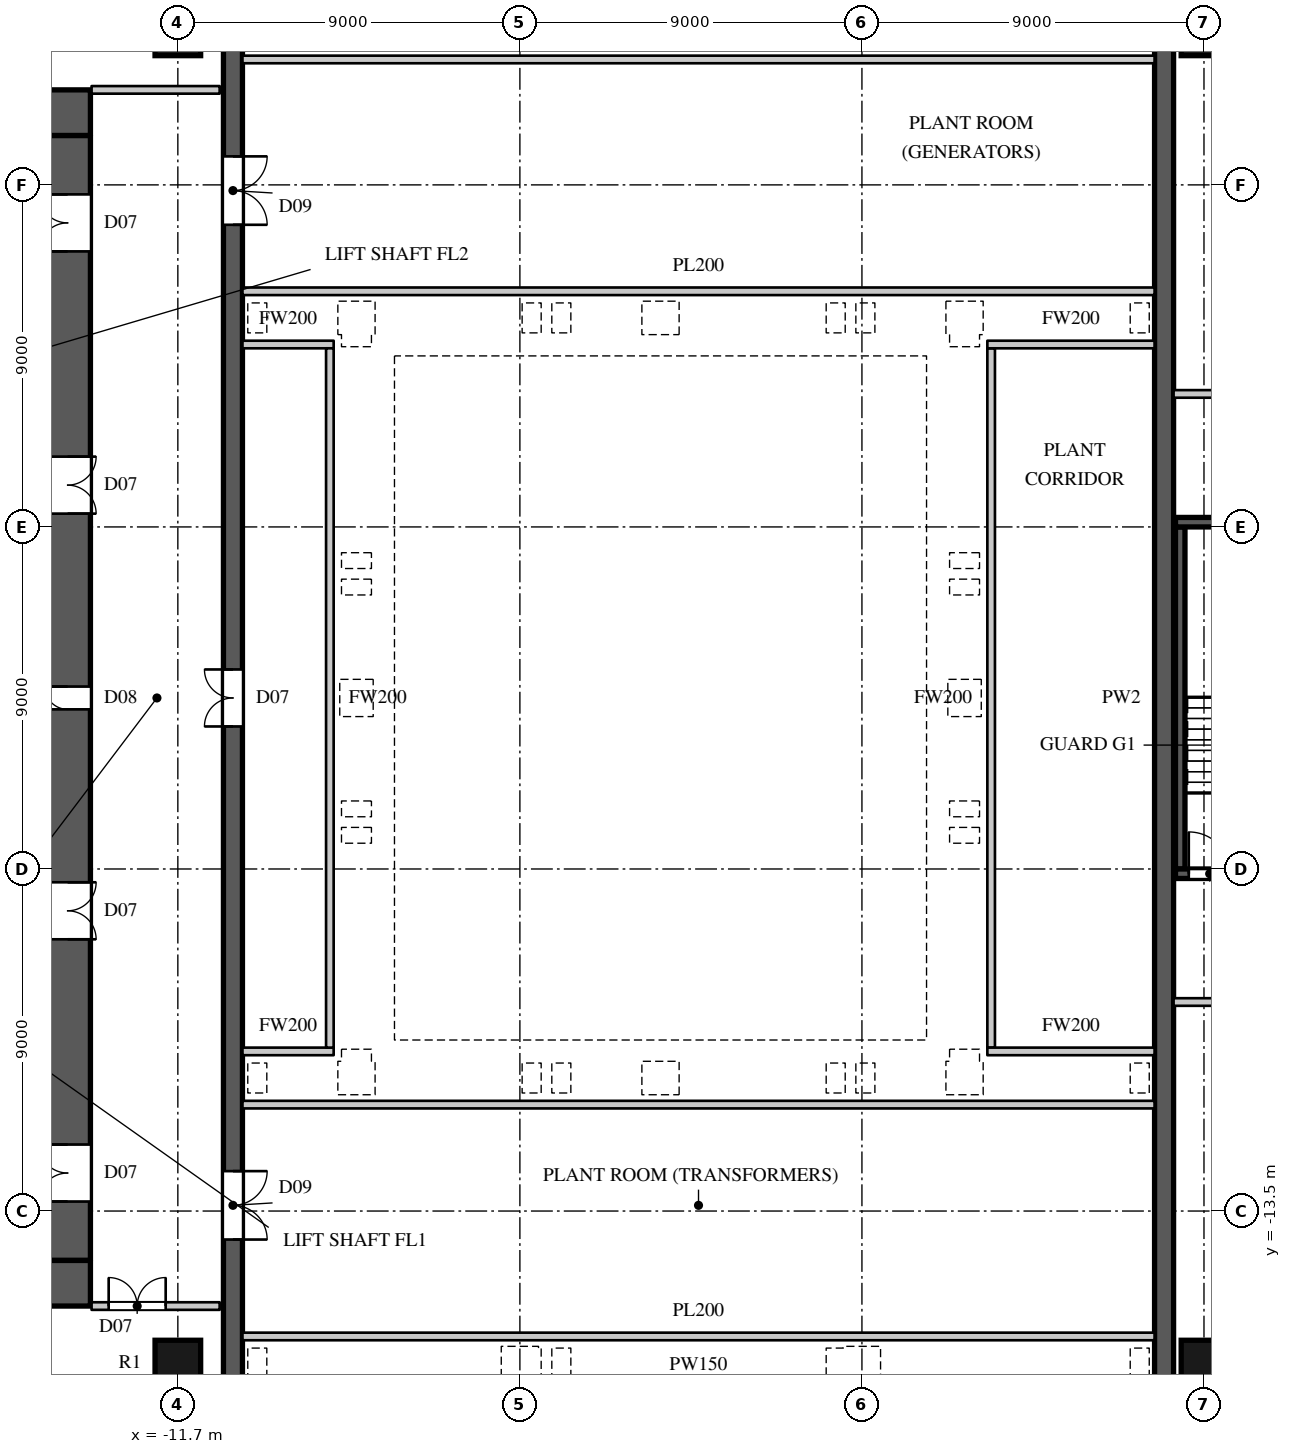
"""IFC4 building model, lengths in metres.
Left out: names, types, materials, properties, quantities, classifications, styles, units other than length and angle.
Written with IfcOpenShell. Run it as: python <this file> out.ifc"""

import sys

from ifc_helpers import new_model, si_unit, direction, frame, frame_2d, origin, origin_2d, place, context, subcontext, project, spatial, rectangle, circle, extrude, element, fill, save


model = new_model("IFC4")
c1 = context("Model", 3, precision=1e-05, world=origin(), true_north=direction((0.0, 1.0)))
c2 = subcontext(c1, "Body", "Model", "MODEL_VIEW")
j1 = project(units=[si_unit("LENGTHUNIT", "METRE"), si_unit("PLANEANGLEUNIT", "RADIAN")], contexts=[c1])
p1 = place(None, origin())
s1 = spatial("IfcSite", under=j1, at=p1, CompositionType="ELEMENT")
p2 = place(p1, origin())
s2 = spatial("IfcBuilding", under=s1, at=p2, CompositionType="ELEMENT")
p3 = place(p2, frame((0.0, 0.0, 29.0)))
s3 = spatial("IfcBuildingStorey", under=s2, at=p3, CompositionType="ELEMENT", Elevation=29.0)
p4 = place(p3, frame((-10.25, -19.5, 0.0), z_axis=(0.0, 0.0, 1.0), x_axis=(0.0, 1.0, 0.0)))
e1 = element("IfcWall", 1, at=p4, inside=s3, PredefinedType="SOLIDWALL", context=c2, shape_type="SweptSolid", body=[
    extrude(rectangle(XDim=39.0, YDim=0.5, at=frame_2d((19.5, 0.0))), origin(), (0.0, 0.0, 1.0), 7.0),
])
p5 = place(p4, frame((18.75, 0.0, 0.0)))
e2 = element("IfcOpeningElement", 2, at=p5, cuts=e1, PredefinedType="OPENING", context=c2, shape_type="SweptSolid", body=[
    extrude(rectangle(XDim=1.5, YDim=2.4, at=frame_2d((0.75, 1.2))), frame((0.0, 0.26, 0.0), z_axis=(0.0, -1.0, 0.0), x_axis=(1.0, 0.0, 0.0)), (0.0, 0.0, 1.0), 0.52),
])
p6 = place(p4, frame((31.95, 0.0, 0.0)))
e3 = element("IfcOpeningElement", 3, at=p6, cuts=e1, PredefinedType="OPENING", context=c2, shape_type="SweptSolid", body=[
    extrude(rectangle(XDim=1.8, YDim=2.4, at=frame_2d((0.9, 1.2))), frame((0.0, 0.26, 0.0), z_axis=(0.0, -1.0, 0.0), x_axis=(1.0, 0.0, 0.0)), (0.0, 0.0, 1.0), 0.52),
])
p7 = place(p4, frame((5.25, 0.0, 0.0)))
e4 = element("IfcOpeningElement", 4, at=p7, cuts=e1, PredefinedType="OPENING", context=c2, shape_type="SweptSolid", body=[
    extrude(rectangle(XDim=1.8, YDim=2.4, at=frame_2d((0.9, 1.2))), frame((0.0, 0.26, 0.0), z_axis=(0.0, -1.0, 0.0), x_axis=(1.0, 0.0, 0.0)), (0.0, 0.0, 1.0), 0.52),
])
p8 = place(p3, frame((14.25, -19.5, 0.0), z_axis=(0.0, 0.0, 1.0), x_axis=(0.0, 1.0, 0.0)))
e5 = element("IfcWall", 5, at=p8, inside=s3, PredefinedType="SOLIDWALL", context=c2, shape_type="SweptSolid", body=[
    extrude(rectangle(XDim=39.0, YDim=0.5, at=frame_2d((19.5, 0.0))), origin(), (0.0, 0.0, 1.0), 7.0),
])
for number, where, z_axis, x_axis in (
    (6, (-11.7, -17.5, 0.0), (0.0, 0.0, 1.0), (1.0, 0.0, 0.0)),
    (7, (15.3, -17.5, 0.0), (0.0, 0.0, 1.0), (1.0, 0.0, 0.0)),
    (8, (-11.7, 17.5, 0.0), (0.0, 0.0, 1.0), (1.0, 0.0, 0.0)),
    (9, (15.3, 17.5, 0.0), (0.0, 0.0, 1.0), (1.0, 0.0, 0.0)),
):
    element("IfcColumn", number, at=place(p3, frame(where, z_axis=z_axis, x_axis=x_axis)), inside=s3, PredefinedType="COLUMN", context=c2, shape_type="SweptSolid", body=[
        extrude(circle(Radius=0.6, at=origin_2d()), origin(), (0.0, 0.0, 1.0), 7.0),
    ])
for number, where, z_axis, x_axis in (
    (10, (-30.0, 15.4, 0.0), (0.0, 0.0, 1.0), (1.0, 0.0, 0.0)),
    (11, (-30.0, -15.4, 0.0), (0.0, 0.0, 1.0), (1.0, 0.0, 0.0)),
):
    element("IfcWall", number, at=place(p3, frame(where, z_axis=z_axis, x_axis=x_axis)), inside=s3, PredefinedType="SHEAR", context=c2, shape_type="SweptSolid", body=[
        extrude(rectangle(XDim=16.0, YDim=1.2, at=frame_2d((8.0, 0.0))), origin(), (0.0, 0.0, 1.0), 7.0),
    ])
p9 = place(p3, frame((-14.6, -14.8, 0.0), z_axis=(0.0, 0.0, 1.0), x_axis=(0.0, 1.0, 0.0)))
e12 = element("IfcWall", 12, at=p9, inside=s3, PredefinedType="SHEAR", context=c2, shape_type="SweptSolid", body=[
    extrude(rectangle(XDim=29.6, YDim=1.2, at=frame_2d((14.8, 0.0))), origin(), (0.0, 0.0, 1.0), 7.0),
])
p10 = place(p9, frame((1.55, 0.0, 0.0)))
e13 = element("IfcOpeningElement", 13, at=p10, cuts=e12, PredefinedType="OPENING", context=c2, shape_type="SweptSolid", body=[
    extrude(rectangle(XDim=1.5, YDim=2.4, at=frame_2d((0.75, 1.2))), frame((0.0, 0.61, 0.0), z_axis=(0.0, -1.0, 0.0), x_axis=(1.0, 0.0, 0.0)), (0.0, 0.0, 1.0), 1.22),
])
p11 = place(p9, frame((26.55, 0.0, 0.0)))
e14 = element("IfcOpeningElement", 14, at=p11, cuts=e12, PredefinedType="OPENING", context=c2, shape_type="SweptSolid", body=[
    extrude(rectangle(XDim=1.5, YDim=2.4, at=frame_2d((0.75, 1.2))), frame((0.0, 0.61, 0.0), z_axis=(0.0, -1.0, 0.0), x_axis=(1.0, 0.0, 0.0)), (0.0, 0.0, 1.0), 1.22),
])
p12 = place(p9, frame((8.45, 0.0, 0.0)))
e15 = element("IfcOpeningElement", 15, at=p12, cuts=e12, PredefinedType="OPENING", context=c2, shape_type="SweptSolid", body=[
    extrude(rectangle(XDim=1.5, YDim=2.4, at=frame_2d((0.75, 1.2))), frame((0.0, 0.61, 0.0), z_axis=(0.0, -1.0, 0.0), x_axis=(1.0, 0.0, 0.0)), (0.0, 0.0, 1.0), 1.22),
])
p13 = place(p9, frame((19.65, 0.0, 0.0)))
e16 = element("IfcOpeningElement", 16, at=p13, cuts=e12, PredefinedType="OPENING", context=c2, shape_type="SweptSolid", body=[
    extrude(rectangle(XDim=1.5, YDim=2.4, at=frame_2d((0.75, 1.2))), frame((0.0, 0.61, 0.0), z_axis=(0.0, -1.0, 0.0), x_axis=(1.0, 0.0, 0.0)), (0.0, 0.0, 1.0), 1.22),
])
p14 = place(p9, frame((14.5, 0.0, 0.0)))
e17 = element("IfcOpeningElement", 17, at=p14, cuts=e12, PredefinedType="OPENING", context=c2, shape_type="SweptSolid", body=[
    extrude(rectangle(XDim=0.6, YDim=2.0, at=frame_2d((0.3, 1.0))), frame((0.0, 0.61, 0.0), z_axis=(0.0, -1.0, 0.0), x_axis=(1.0, 0.0, 0.0)), (0.0, 0.0, 1.0), 1.22),
])
p15 = place(p3, frame((-13.97, -16.0, 0.0), z_axis=(0.0, 0.0, 1.0), x_axis=(1.0, 0.0, 0.0)))
e18 = element("IfcWall", 18, at=p15, inside=s3, PredefinedType="PARTITIONING", context=c2, shape_type="SweptSolid", body=[
    extrude(rectangle(XDim=3.37, YDim=0.2, at=frame_2d((1.685, 0.0))), origin(), (0.0, 0.0, 1.0), 6.598),
])
p16 = place(p15, frame((0.45, 0.0, 0.0)))
e19 = element("IfcOpeningElement", 19, at=p16, cuts=e18, PredefinedType="OPENING", context=c2, shape_type="SweptSolid", body=[
    extrude(rectangle(XDim=1.5, YDim=2.4, at=frame_2d((0.75, 1.2))), frame((0.0, 0.11, 0.0), z_axis=(0.0, -1.0, 0.0), x_axis=(1.0, 0.0, 0.0)), (0.0, 0.0, 1.0), 0.22),
])
p17 = place(p3, frame((-13.97, 16.0, 0.0), z_axis=(0.0, 0.0, 1.0), x_axis=(1.0, 0.0, 0.0)))
e20 = element("IfcWall", 20, at=p17, inside=s3, PredefinedType="PARTITIONING", context=c2, shape_type="SweptSolid", body=[
    extrude(rectangle(XDim=3.37, YDim=0.2, at=frame_2d((1.685, 0.0))), origin(), (0.0, 0.0, 1.0), 6.598),
])
for number, where, z_axis, x_axis in (
    (21, (-10.0, -9.3, 0.0), (0.0, 0.0, 1.0), (1.0, 0.0, 0.0)),
    (22, (-10.0, 9.3, 0.0), (0.0, 0.0, 1.0), (1.0, 0.0, 0.0)),
):
    element("IfcWall", number, at=place(p3, frame(where, z_axis=z_axis, x_axis=x_axis)), inside=s3, PredefinedType="PARTITIONING", context=c2, shape_type="SweptSolid", body=[
        extrude(rectangle(XDim=2.4, YDim=0.2, at=frame_2d((1.2, 0.0))), origin(), (0.0, 0.0, 1.0), 6.598),
    ])
for number, where, z_axis, x_axis in (
    (23, (-7.7, -9.2, 0.0), (0.0, 0.0, 1.0), (0.0, 1.0, 0.0)),
    (24, (9.7, -9.2, 0.0), (0.0, 0.0, 1.0), (0.0, 1.0, 0.0)),
):
    element("IfcWall", number, at=place(p3, frame(where, z_axis=z_axis, x_axis=x_axis)), inside=s3, PredefinedType="PARTITIONING", context=c2, shape_type="SweptSolid", body=[
        extrude(rectangle(XDim=18.4, YDim=0.2, at=frame_2d((9.2, 0.0))), origin(), (0.0, 0.0, 1.0), 6.598),
    ])
for number, where, z_axis, x_axis in (
    (25, (9.6, -9.3, 0.0), (0.0, 0.0, 1.0), (1.0, 0.0, 0.0)),
    (26, (9.6, 9.3, 0.0), (0.0, 0.0, 1.0), (1.0, 0.0, 0.0)),
):
    element("IfcWall", number, at=place(p3, frame(where, z_axis=z_axis, x_axis=x_axis)), inside=s3, PredefinedType="PARTITIONING", context=c2, shape_type="SweptSolid", body=[
        extrude(rectangle(XDim=4.4, YDim=0.2, at=frame_2d((2.2, 0.0))), origin(), (0.0, 0.0, 1.0), 6.598),
    ])
p18 = place(p3, frame((14.5, -8.0, 0.0), z_axis=(0.0, 0.0, 1.0), x_axis=(1.0, 0.0, 0.0)))
e27 = element("IfcWall", 27, at=p18, inside=s3, PredefinedType="PARTITIONING", context=c2, shape_type="SweptSolid", body=[
    extrude(rectangle(XDim=13.47, YDim=0.2, at=frame_2d((6.735, 0.0))), origin(), (0.0, 0.0, 1.0), 6.598),
])
p19 = place(p18, frame((5.9, 0.0, 0.0)))
e28 = element("IfcOpeningElement", 28, at=p19, cuts=e27, PredefinedType="OPENING", context=c2, shape_type="SweptSolid", body=[
    extrude(rectangle(XDim=1.6, YDim=2.4, at=frame_2d((0.8, 1.2))), frame((0.0, 0.11, 0.0), z_axis=(0.0, -1.0, 0.0), x_axis=(1.0, 0.0, 0.0)), (0.0, 0.0, 1.0), 0.22),
])
for number, where, z_axis, x_axis in (
    (29, (-10.0, -16.8, 0.0), (0.0, 0.0, 1.0), (1.0, 0.0, 0.0)),
    (30, (-10.0, -10.7, 0.0), (0.0, 0.0, 1.0), (1.0, 0.0, 0.0)),
    (31, (-10.0, 10.7, 0.0), (0.0, 0.0, 1.0), (1.0, 0.0, 0.0)),
    (32, (-10.0, 16.8, 0.0), (0.0, 0.0, 1.0), (1.0, 0.0, 0.0)),
):
    element("IfcWall", number, at=place(p3, frame(where, z_axis=z_axis, x_axis=x_axis)), inside=s3, PredefinedType="PARTITIONING", context=c2, shape_type="SweptSolid", body=[
        extrude(rectangle(XDim=24.0, YDim=0.2, at=frame_2d((12.0, 0.0))), origin(), (0.0, 0.0, 1.0), 6.598),
    ])
p20 = place(p3, frame((14.5, 8.0, 0.0), z_axis=(0.0, 0.0, 1.0), x_axis=(1.0, 0.0, 0.0)))
e33 = element("IfcWall", 33, at=p20, inside=s3, PredefinedType="PARTITIONING", context=c2, shape_type="SweptSolid", body=[
    extrude(rectangle(XDim=13.47, YDim=0.2, at=frame_2d((6.735, 0.0))), origin(), (0.0, 0.0, 1.0), 6.598),
])
p21 = place(p20, frame((2.4, 0.0, 0.0)))
e34 = element("IfcOpeningElement", 34, at=p21, cuts=e33, PredefinedType="OPENING", context=c2, shape_type="SweptSolid", body=[
    extrude(rectangle(XDim=1.8, YDim=2.4, at=frame_2d((0.9, 1.2))), frame((0.0, 0.11, 0.0), z_axis=(0.0, -1.0, 0.0), x_axis=(1.0, 0.0, 0.0)), (0.0, 0.0, 1.0), 0.22),
])
p22 = place(p20, frame((9.05, 0.0, 0.0)))
e35 = element("IfcOpeningElement", 35, at=p22, cuts=e33, PredefinedType="OPENING", context=c2, shape_type="SweptSolid", body=[
    extrude(rectangle(XDim=1.8, YDim=2.4, at=frame_2d((0.9, 1.2))), frame((0.0, 0.11, 0.0), z_axis=(0.0, -1.0, 0.0), x_axis=(1.0, 0.0, 0.0)), (0.0, 0.0, 1.0), 0.22),
])
p23 = place(p3, frame((14.675, -4.5, 0.0), z_axis=(0.0, 0.0, 1.0), x_axis=(0.0, 1.0, 0.0)))
e36 = element("IfcWall", 36, at=p23, inside=s3, PredefinedType="SHEAR", context=c2, shape_type="SweptSolid", body=[
    extrude(rectangle(XDim=9.0, YDim=0.25, at=frame_2d((4.5, 0.0))), origin(), (0.0, 0.0, 1.0), 6.6),
])
p24 = place(p3, frame((14.55, -4.625, 0.0), z_axis=(0.0, 0.0, 1.0), x_axis=(1.0, 0.0, 0.0)))
e37 = element("IfcWall", 37, at=p24, inside=s3, PredefinedType="SHEAR", context=c2, shape_type="SweptSolid", body=[
    extrude(rectangle(XDim=4.7, YDim=0.25, at=frame_2d((2.35, 0.0))), origin(), (0.0, 0.0, 1.0), 6.6),
])
p25 = place(p24, frame((0.35, 0.0, 0.0)))
e38 = element("IfcOpeningElement", 38, at=p25, cuts=e37, PredefinedType="OPENING", context=c2, shape_type="SweptSolid", body=[
    extrude(rectangle(XDim=1.1, YDim=2.2, at=frame_2d((0.55, 1.1))), frame((0.0, 0.135, 0.0), z_axis=(0.0, -1.0, 0.0), x_axis=(1.0, 0.0, 0.0)), (0.0, 0.0, 1.0), 0.27),
])
p26 = place(p3, frame((14.55, 4.625, 0.0), z_axis=(0.0, 0.0, 1.0), x_axis=(1.0, 0.0, 0.0)))
e39 = element("IfcWall", 39, at=p26, inside=s3, PredefinedType="SHEAR", context=c2, shape_type="SweptSolid", body=[
    extrude(rectangle(XDim=4.7, YDim=0.25, at=frame_2d((2.35, 0.0))), origin(), (0.0, 0.0, 1.0), 6.6),
])
p27 = place(p16, origin())
e40 = element("IfcDoor", 40, at=p27, inside=s3, OperationType="DOUBLE_DOOR_SINGLE_SWING", PredefinedType="DOOR", context=c2, shape_type="SweptSolid", body=[
    extrude(rectangle(XDim=1.5, YDim=2.4, at=frame_2d((0.75, 1.2))), frame((0.0, 0.025, 0.0), z_axis=(0.0, -1.0, 0.0), x_axis=(1.0, 0.0, 0.0)), (0.0, 0.0, 1.0), 0.05),
])
fill(e19, e40)
p28 = place(p5, origin())
e41 = element("IfcDoor", 41, at=p28, inside=s3, OperationType="DOUBLE_DOOR_SINGLE_SWING", PredefinedType="DOOR", context=c2, shape_type="SweptSolid", body=[
    extrude(rectangle(XDim=1.5, YDim=2.4, at=frame_2d((0.75, 1.2))), frame((0.0, 0.245, 0.0), z_axis=(0.0, -1.0, 0.0), x_axis=(1.0, 0.0, 0.0)), (0.0, 0.0, 1.0), 0.05),
])
fill(e2, e41)
p29 = place(p6, origin())
e42 = element("IfcDoor", 42, at=p29, inside=s3, OperationType="DOUBLE_DOOR_SINGLE_SWING", PredefinedType="DOOR", context=c2, shape_type="SweptSolid", body=[
    extrude(rectangle(XDim=1.8, YDim=2.4, at=frame_2d((0.9, 1.2))), frame((0.0, -0.195, 0.0), z_axis=(0.0, -1.0, 0.0), x_axis=(1.0, 0.0, 0.0)), (0.0, 0.0, 1.0), 0.05),
])
fill(e3, e42)
p30 = place(p7, origin())
e43 = element("IfcDoor", 43, at=p30, inside=s3, OperationType="DOUBLE_DOOR_SINGLE_SWING", PredefinedType="DOOR", context=c2, shape_type="SweptSolid", body=[
    extrude(rectangle(XDim=1.8, YDim=2.4, at=frame_2d((0.9, 1.2))), frame((0.0, -0.195, 0.0), z_axis=(0.0, -1.0, 0.0), x_axis=(1.0, 0.0, 0.0)), (0.0, 0.0, 1.0), 0.05),
])
fill(e4, e43)
p31 = place(p10, origin())
e44 = element("IfcDoor", 44, at=p31, inside=s3, OperationType="DOUBLE_DOOR_SINGLE_SWING", PredefinedType="DOOR", context=c2, shape_type="SweptSolid", body=[
    extrude(rectangle(XDim=1.5, YDim=2.4, at=frame_2d((0.75, 1.2))), frame((0.0, 0.025, 0.0), z_axis=(0.0, -1.0, 0.0), x_axis=(1.0, 0.0, 0.0)), (0.0, 0.0, 1.0), 0.05),
])
fill(e13, e44)
p32 = place(p11, origin())
e45 = element("IfcDoor", 45, at=p32, inside=s3, OperationType="DOUBLE_DOOR_SINGLE_SWING", PredefinedType="DOOR", context=c2, shape_type="SweptSolid", body=[
    extrude(rectangle(XDim=1.5, YDim=2.4, at=frame_2d((0.75, 1.2))), frame((0.0, 0.025, 0.0), z_axis=(0.0, -1.0, 0.0), x_axis=(1.0, 0.0, 0.0)), (0.0, 0.0, 1.0), 0.05),
])
fill(e14, e45)
p33 = place(p12, origin())
e46 = element("IfcDoor", 46, at=p33, inside=s3, OperationType="DOUBLE_DOOR_SINGLE_SWING", PredefinedType="DOOR", context=c2, shape_type="SweptSolid", body=[
    extrude(rectangle(XDim=1.5, YDim=2.4, at=frame_2d((0.75, 1.2))), frame((0.0, 0.025, 0.0), z_axis=(0.0, -1.0, 0.0), x_axis=(1.0, 0.0, 0.0)), (0.0, 0.0, 1.0), 0.05),
])
fill(e15, e46)
p34 = place(p13, origin())
e47 = element("IfcDoor", 47, at=p34, inside=s3, OperationType="DOUBLE_DOOR_SINGLE_SWING", PredefinedType="DOOR", context=c2, shape_type="SweptSolid", body=[
    extrude(rectangle(XDim=1.5, YDim=2.4, at=frame_2d((0.75, 1.2))), frame((0.0, 0.025, 0.0), z_axis=(0.0, -1.0, 0.0), x_axis=(1.0, 0.0, 0.0)), (0.0, 0.0, 1.0), 0.05),
])
fill(e16, e47)
p35 = place(p14, origin())
e48 = element("IfcDoor", 48, at=p35, inside=s3, OperationType="SINGLE_SWING_RIGHT", PredefinedType="DOOR", context=c2, shape_type="SweptSolid", body=[
    extrude(rectangle(XDim=0.6, YDim=2.0, at=frame_2d((0.3, 1.0))), frame((0.0, 0.025, 0.0), z_axis=(0.0, -1.0, 0.0), x_axis=(1.0, 0.0, 0.0)), (0.0, 0.0, 1.0), 0.05),
])
fill(e17, e48)
p36 = place(p25, origin())
e49 = element("IfcDoor", 49, at=p36, inside=s3, OperationType="SINGLE_SWING_LEFT", PredefinedType="DOOR", context=c2, shape_type="SweptSolid", body=[
    extrude(rectangle(XDim=1.1, YDim=2.2, at=frame_2d((0.55, 1.1))), frame((0.0, 0.025, 0.0), z_axis=(0.0, -1.0, 0.0), x_axis=(1.0, 0.0, 0.0)), (0.0, 0.0, 1.0), 0.05),
])
fill(e38, e49)
save(model, sys.argv[1])
